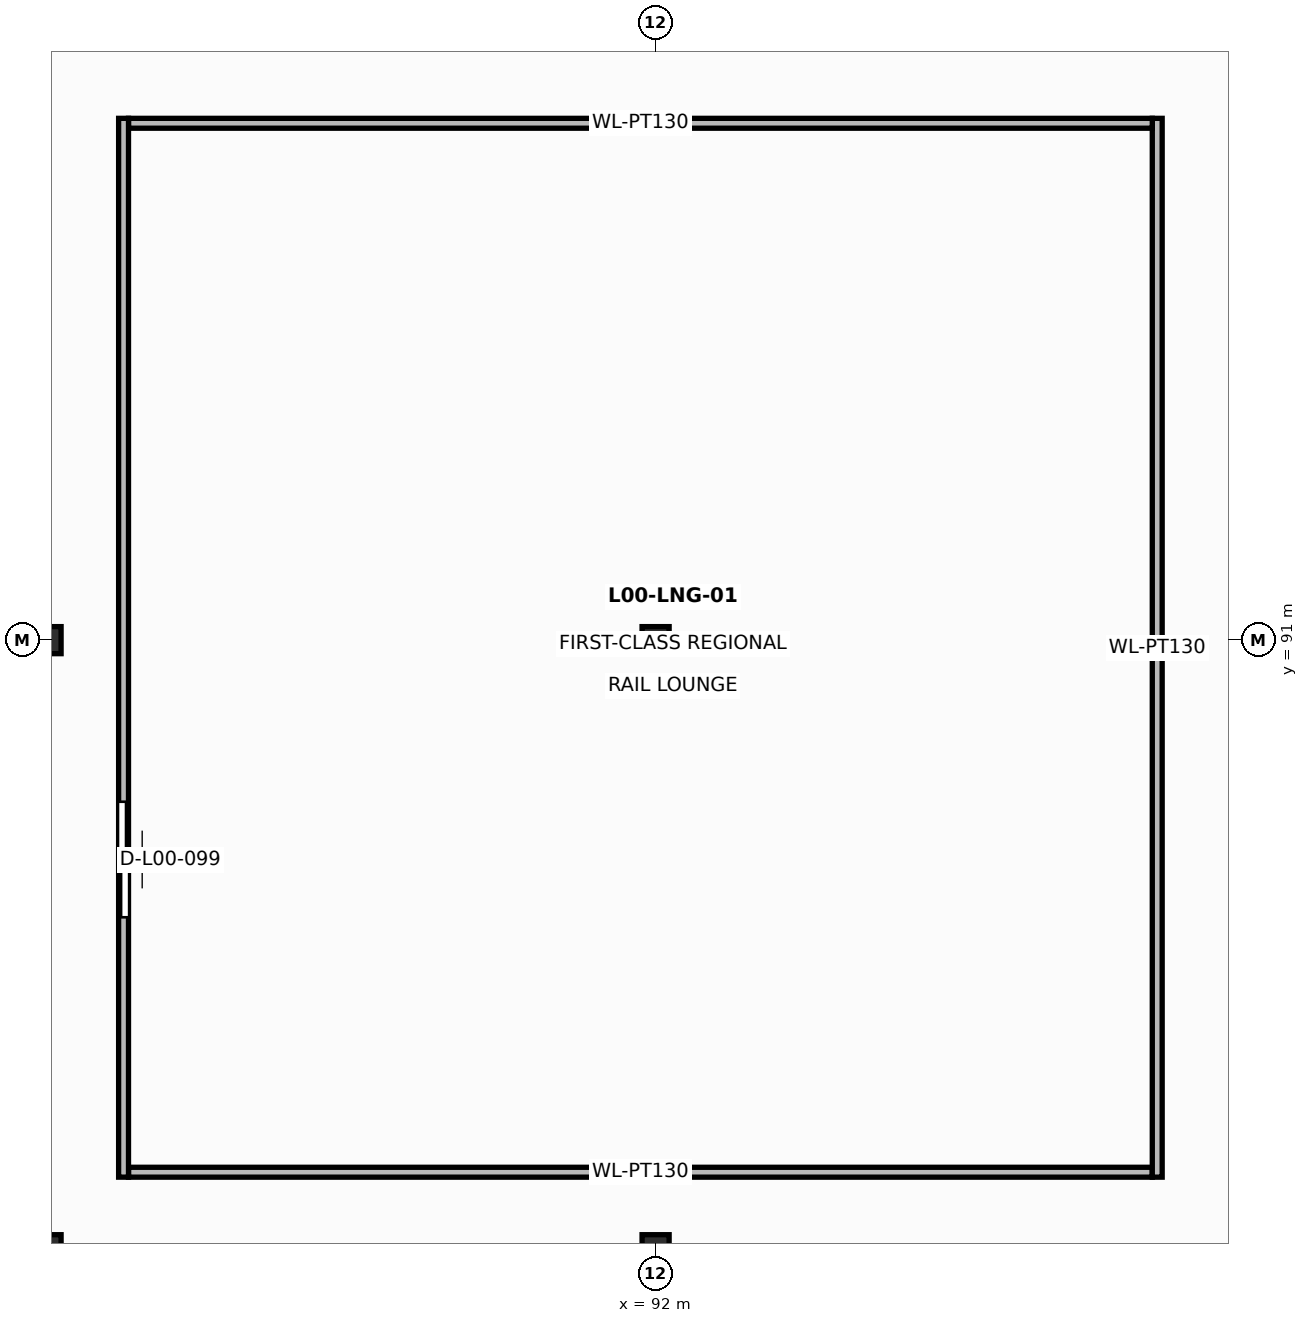
"""IFC4 building model, lengths in metres.
Left out: names, types, materials, properties, quantities, classifications, styles, units other than length and angle.
Written with IfcOpenShell. Run it as: python <this file> out.ifc"""

import sys

from ifc_helpers import new_model, si_unit, direction, frame, frame_2d, origin, origin_2d, place, context, subcontext, project, spatial, rectangle, hollow_rectangle, extrude, element, fill, save


model = new_model("IFC4")
c1 = context("Model", 3, precision=1e-05, world=origin(), true_north=direction((0.0, 1.0)))
c2 = subcontext(c1, "Body", "Model", "MODEL_VIEW")
j1 = project(units=[si_unit("LENGTHUNIT", "METRE"), si_unit("PLANEANGLEUNIT", "RADIAN")], contexts=[c1])
p1 = place(None, origin())
s1 = spatial("IfcSite", under=j1, at=p1, CompositionType="ELEMENT")
p2 = place(p1, origin())
s2 = spatial("IfcBuilding", under=s1, at=p2, CompositionType="ELEMENT")
p3 = place(p2, origin())
s3 = spatial("IfcBuildingStorey", under=s2, at=p3, CompositionType="ELEMENT", Elevation=0.0)
for number, where, z_axis, x_axis in (
    (1, (84.0, 83.0, 0.0), (0.0, 0.0, 1.0), (1.0, 0.0, 0.0)),
    (2, (84.0, 91.0, 0.0), (0.0, 0.0, 1.0), (1.0, 0.0, 0.0)),
    (3, (92.0, 83.0, 0.0), (0.0, 0.0, 1.0), (1.0, 0.0, 0.0)),
    (4, (92.0, 91.0, 0.0), (0.0, 0.0, 1.0), (1.0, 0.0, 0.0)),
):
    element("IfcColumn", number, at=place(p3, frame(where, z_axis=z_axis, x_axis=x_axis)), inside=s3, PredefinedType="COLUMN", context=c2, shape_type="SweptSolid", body=[
        extrude(hollow_rectangle(XDim=0.356, YDim=0.356, WallThickness=0.015, at=origin_2d()), origin(), (0.0, 0.0, 1.0), 6.0),
    ])
p4 = place(p3, frame((85.065, 84.0, 0.0), z_axis=(0.0, 0.0, 1.0), x_axis=(1.0, 0.0, 0.0)))
e5 = element("IfcWall", 5, at=p4, inside=s3, PredefinedType="PARTITIONING", context=c2, shape_type="SweptSolid", body=[
    extrude(rectangle(XDim=13.47, YDim=0.13, at=frame_2d((6.735, 0.0))), origin(), (0.0, 0.0, 1.0), 4.976),
])
p5 = place(p3, frame((98.6, 83.935, 0.0), z_axis=(0.0, 0.0, 1.0), x_axis=(0.0, 1.0, 0.0)))
e6 = element("IfcWall", 6, at=p5, inside=s3, PredefinedType="PARTITIONING", context=c2, shape_type="SweptSolid", body=[
    extrude(rectangle(XDim=13.93, YDim=0.13, at=frame_2d((6.965, 0.0))), origin(), (0.0, 0.0, 1.0), 5.138),
])
p6 = place(p3, frame((98.535, 97.8, 0.0), z_axis=(0.0, 0.0, 1.0), x_axis=(-1.0, 0.0, 0.0)))
e7 = element("IfcWall", 7, at=p6, inside=s3, PredefinedType="PARTITIONING", context=c2, shape_type="SweptSolid", body=[
    extrude(rectangle(XDim=13.47, YDim=0.13, at=frame_2d((6.735, 0.0))), origin(), (0.0, 0.0, 1.0), 4.947),
])
p7 = place(p3, frame((85.0, 97.865, 0.0), z_axis=(0.0, 0.0, 1.0), x_axis=(0.0, -1.0, 0.0)))
e8 = element("IfcWall", 8, at=p7, inside=s3, PredefinedType="PARTITIONING", context=c2, shape_type="SweptSolid", body=[
    extrude(rectangle(XDim=13.93, YDim=0.13, at=frame_2d((6.965, 0.0))), origin(), (0.0, 0.0, 1.0), 5.138),
])
p8 = place(p7, frame((8.991, 0.0, 0.0)))
e9 = element("IfcOpeningElement", 9, at=p8, cuts=e8, PredefinedType="OPENING", context=c2, shape_type="SweptSolid", body=[
    extrude(rectangle(XDim=1.52, YDim=2.2, at=frame_2d((0.76, 1.1))), frame((0.0, 0.075, 0.0), z_axis=(0.0, -1.0, 0.0), x_axis=(1.0, 0.0, 0.0)), (0.0, 0.0, 1.0), 0.15),
])
p9 = place(p8, origin())
e10 = element("IfcDoor", 10, at=p9, inside=s3, OperationType="DOUBLE_DOOR_SLIDING", PredefinedType="DOOR", context=c2, shape_type="SweptSolid", body=[
    extrude(rectangle(XDim=1.52, YDim=2.2, at=frame_2d((0.76, 1.1))), frame((0.0, 0.025, 0.0), z_axis=(0.0, -1.0, 0.0), x_axis=(1.0, 0.0, 0.0)), (0.0, 0.0, 1.0), 0.05),
])
fill(e9, e10)
save(model, sys.argv[1])
